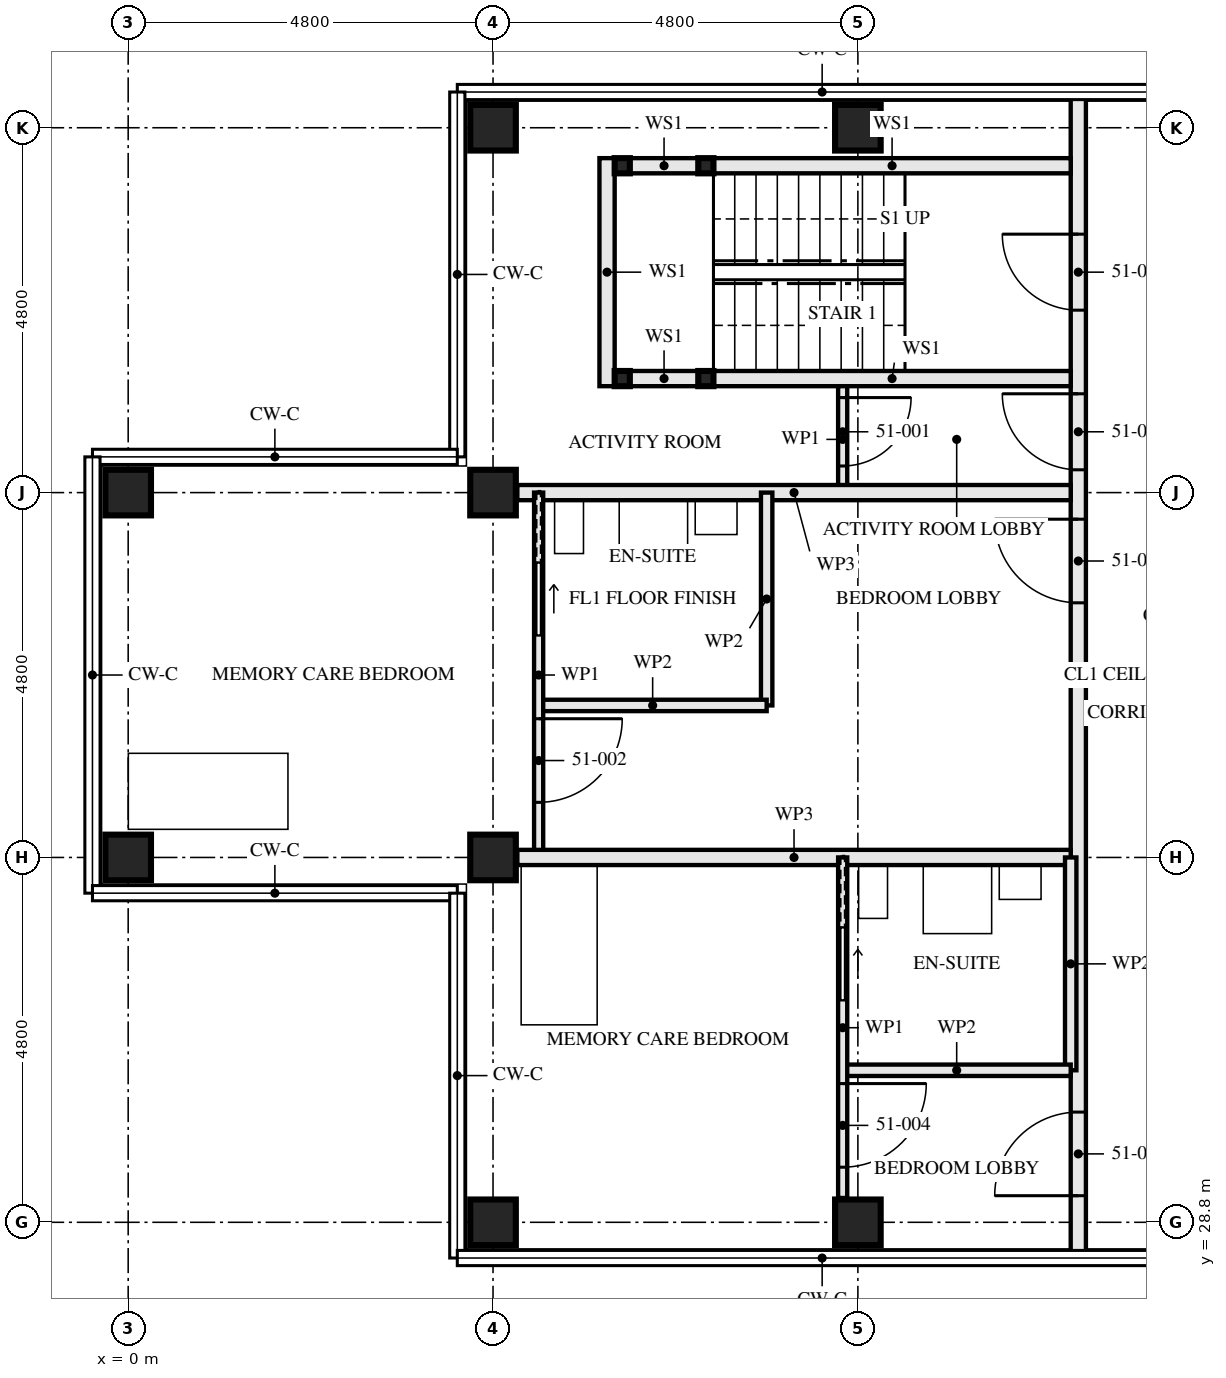
"""IFC4 building model, lengths in metres.
Left out: names, types, materials, properties, quantities, classifications, styles, units other than length and angle.
Written with IfcOpenShell. Run it as: python <this file> out.ifc"""

import sys

from ifc_helpers import new_model, si_unit, direction, frame, frame_2d, origin, origin_2d, place, context, subcontext, project, spatial, rectangle, hollow_rectangle, extrude, element, fill, save


model = new_model("IFC4")
c1 = context("Model", 3, precision=1e-05, world=origin(), true_north=direction((0.0, 1.0)))
c2 = subcontext(c1, "Body", "Model", "MODEL_VIEW")
j1 = project(units=[si_unit("LENGTHUNIT", "METRE"), si_unit("PLANEANGLEUNIT", "RADIAN")], contexts=[c1])
p1 = place(None, origin())
s1 = spatial("IfcSite", under=j1, at=p1, CompositionType="ELEMENT")
p2 = place(p1, origin())
s2 = spatial("IfcBuilding", under=s1, at=p2, CompositionType="ELEMENT")
p3 = place(p2, frame((0.0, 0.0, 186.5)))
s3 = spatial("IfcBuildingStorey", under=s2, at=p3, CompositionType="ELEMENT", Elevation=186.5)
for number, where, z_axis, x_axis in (
    (1, (0.0, 33.6, 0.0), (0.0, 0.0, 1.0), (0.0, 1.0, 0.0)),
    (2, (0.0, 38.4, 0.0), (0.0, 0.0, 1.0), (0.0, 1.0, 0.0)),
    (3, (4.8, 28.8, 0.0), (0.0, 0.0, 1.0), (0.0, 1.0, 0.0)),
    (4, (4.8, 33.6, 0.0), (0.0, 0.0, 1.0), (0.0, 1.0, 0.0)),
    (5, (4.8, 38.4, 0.0), (0.0, 0.0, 1.0), (0.0, 1.0, 0.0)),
    (6, (4.8, 43.2, 0.0), (0.0, 0.0, 1.0), (0.0, 1.0, 0.0)),
    (7, (9.6, 28.8, 0.0), (0.0, 0.0, 1.0), (0.0, 1.0, 0.0)),
    (8, (9.6, 43.2, 0.0), (0.0, 0.0, 1.0), (0.0, 1.0, 0.0)),
):
    element("IfcColumn", number, at=place(p3, frame(where, z_axis=z_axis, x_axis=x_axis)), inside=s3, PredefinedType="COLUMN", context=c2, shape_type="SweptSolid", body=[
        extrude(hollow_rectangle(XDim=0.6, YDim=0.6, WallThickness=0.08, at=origin_2d()), origin(), (0.0, 0.0, 1.0), 3.5),
    ])
for number, where, z_axis, x_axis in (
    (9, (6.5, 42.7, 0.0), (0.0, 0.0, 1.0), (1.0, 0.0, 0.0)),
    (10, (6.5, 39.9, 0.0), (0.0, 0.0, 1.0), (1.0, 0.0, 0.0)),
    (11, (7.6, 42.7, 0.0), (0.0, 0.0, 1.0), (1.0, 0.0, 0.0)),
    (12, (7.6, 39.9, 0.0), (0.0, 0.0, 1.0), (1.0, 0.0, 0.0)),
):
    element("IfcColumn", number, at=place(p3, frame(where, z_axis=z_axis, x_axis=x_axis)), inside=s3, PredefinedType="COLUMN", context=c2, shape_type="SweptSolid", body=[
        extrude(hollow_rectangle(XDim=0.2, YDim=0.2, WallThickness=0.008, at=origin_2d()), origin(), (0.0, 0.0, 1.0), 3.25),
    ])
p4 = place(p3, frame((6.6, 42.7, 0.0), z_axis=(0.0, 0.0, 1.0), x_axis=(1.0, 0.0, 0.0)))
e13 = element("IfcWall", 13, at=p4, inside=s3, PredefinedType="SOLIDWALL", context=c2, shape_type="SweptSolid", body=[
    extrude(rectangle(XDim=0.9, YDim=0.2, at=frame_2d((0.45, 0.0))), origin(), (0.0, 0.0, 1.0), 2.94),
])
p5 = place(p3, frame((7.7, 42.7, 0.0), z_axis=(0.0, 0.0, 1.0), x_axis=(1.0, 0.0, 0.0)))
e14 = element("IfcWall", 14, at=p5, inside=s3, PredefinedType="SOLIDWALL", context=c2, shape_type="SweptSolid", body=[
    extrude(rectangle(XDim=4.7, YDim=0.2, at=frame_2d((2.35, 0.0))), origin(), (0.0, 0.0, 1.0), 2.94),
])
p6 = place(p3, frame((6.6, 39.9, 0.0), z_axis=(0.0, 0.0, 1.0), x_axis=(1.0, 0.0, 0.0)))
e15 = element("IfcWall", 15, at=p6, inside=s3, PredefinedType="SOLIDWALL", context=c2, shape_type="SweptSolid", body=[
    extrude(rectangle(XDim=0.9, YDim=0.2, at=frame_2d((0.45, 0.0))), origin(), (0.0, 0.0, 1.0), 2.94),
])
p7 = place(p3, frame((7.7, 39.9, 0.0), z_axis=(0.0, 0.0, 1.0), x_axis=(1.0, 0.0, 0.0)))
e16 = element("IfcWall", 16, at=p7, inside=s3, PredefinedType="SOLIDWALL", context=c2, shape_type="SweptSolid", body=[
    extrude(rectangle(XDim=4.7, YDim=0.2, at=frame_2d((2.35, 0.0))), origin(), (0.0, 0.0, 1.0), 2.94),
])
p8 = place(p3, frame((6.3, 42.8, 0.0), z_axis=(0.0, 0.0, 1.0), x_axis=(0.0, -1.0, 0.0)))
e17 = element("IfcWall", 17, at=p8, inside=s3, PredefinedType="SOLIDWALL", context=c2, shape_type="SweptSolid", body=[
    extrude(rectangle(XDim=3.0, YDim=0.2, at=frame_2d((1.5, 0.0))), origin(), (0.0, 0.0, 1.0), 3.25),
])
p9 = place(p3, frame((9.4, 39.8, 0.0), z_axis=(0.0, 0.0, 1.0), x_axis=(0.0, -1.0, 0.0)))
e18 = element("IfcWall", 18, at=p9, inside=s3, PredefinedType="PARTITIONING", context=c2, shape_type="SweptSolid", body=[
    extrude(rectangle(XDim=1.4, YDim=0.12, at=frame_2d((0.7, 0.0))), origin(), (0.0, 0.0, 1.0), 3.25),
])
p10 = place(p9, frame((0.15, 0.0, 0.0)))
e19 = element("IfcOpeningElement", 19, at=p10, cuts=e18, PredefinedType="OPENING", context=c2, shape_type="SweptSolid", body=[
    extrude(rectangle(XDim=0.9, YDim=2.1, at=frame_2d((0.45, 1.05))), frame((0.0, 0.071, 0.0), z_axis=(0.0, -1.0, 0.0), x_axis=(1.0, 0.0, 0.0)), (0.0, 0.0, 1.0), 0.141),
])
p11 = place(p3, frame((5.12, 38.4, 0.0), z_axis=(0.0, 0.0, 1.0), x_axis=(1.0, 0.0, 0.0)))
e20 = element("IfcWall", 20, at=p11, inside=s3, PredefinedType="PARTITIONING", context=c2, shape_type="SweptSolid", body=[
    extrude(rectangle(XDim=7.28, YDim=0.2, at=frame_2d((3.64, 0.0))), origin(), (0.0, 0.0, 1.0), 2.24),
])
p12 = place(p3, frame((5.4, 35.6, 0.0), z_axis=(0.0, 0.0, 1.0), x_axis=(1.0, 0.0, 0.0)))
e21 = element("IfcWall", 21, at=p12, inside=s3, PredefinedType="PARTITIONING", context=c2, shape_type="SweptSolid", body=[
    extrude(rectangle(XDim=3.0, YDim=0.15, at=frame_2d((1.5, 0.0))), origin(), (0.0, 0.0, 1.0), 3.25),
])
p13 = place(p3, frame((8.4, 38.4, 0.0), z_axis=(0.0, 0.0, 1.0), x_axis=(0.0, -1.0, 0.0)))
e22 = element("IfcWall", 22, at=p13, inside=s3, PredefinedType="PARTITIONING", context=c2, shape_type="SweptSolid", body=[
    extrude(rectangle(XDim=2.8, YDim=0.15, at=frame_2d((1.4, 0.0))), origin(), (0.0, 0.0, 1.0), 3.25),
])
p14 = place(p3, frame((5.4, 38.4, 0.0), z_axis=(0.0, 0.0, 1.0), x_axis=(0.0, -1.0, 0.0)))
e23 = element("IfcWall", 23, at=p14, inside=s3, PredefinedType="PARTITIONING", context=c2, shape_type="SweptSolid", body=[
    extrude(rectangle(XDim=4.8, YDim=0.12, at=frame_2d((2.4, 0.0))), origin(), (0.0, 0.0, 1.0), 3.25),
])
p15 = place(p14, frame((2.975, 0.0, 0.0)))
e24 = element("IfcOpeningElement", 24, at=p15, cuts=e23, PredefinedType="OPENING", context=c2, shape_type="SweptSolid", body=[
    extrude(rectangle(XDim=1.1, YDim=2.1, at=frame_2d((0.55, 1.05))), frame((0.0, 0.071, 0.0), z_axis=(0.0, -1.0, 0.0), x_axis=(1.0, 0.0, 0.0)), (0.0, 0.0, 1.0), 0.141),
])
p16 = place(p14, frame((0.925, 0.0, 0.0)))
e25 = element("IfcOpeningElement", 25, at=p16, cuts=e23, PredefinedType="OPENING", context=c2, shape_type="SweptSolid", body=[
    extrude(rectangle(XDim=0.95, YDim=2.1, at=frame_2d((0.475, 1.05))), frame((0.0, 0.071, 0.0), z_axis=(0.0, -1.0, 0.0), x_axis=(1.0, 0.0, 0.0)), (0.0, 0.0, 1.0), 0.141),
])
p17 = place(p3, frame((5.12, 33.6, 0.0), z_axis=(0.0, 0.0, 1.0), x_axis=(1.0, 0.0, 0.0)))
e26 = element("IfcWall", 26, at=p17, inside=s3, PredefinedType="PARTITIONING", context=c2, shape_type="SweptSolid", body=[
    extrude(rectangle(XDim=7.28, YDim=0.2, at=frame_2d((3.64, 0.0))), origin(), (0.0, 0.0, 1.0), 2.24),
])
p18 = place(p3, frame((9.4, 30.8, 0.0), z_axis=(0.0, 0.0, 1.0), x_axis=(1.0, 0.0, 0.0)))
e27 = element("IfcWall", 27, at=p18, inside=s3, PredefinedType="PARTITIONING", context=c2, shape_type="SweptSolid", body=[
    extrude(rectangle(XDim=3.0, YDim=0.15, at=frame_2d((1.5, 0.0))), origin(), (0.0, 0.0, 1.0), 3.25),
])
p19 = place(p3, frame((12.4, 33.6, 0.0), z_axis=(0.0, 0.0, 1.0), x_axis=(0.0, -1.0, 0.0)))
e28 = element("IfcWall", 28, at=p19, inside=s3, PredefinedType="PARTITIONING", context=c2, shape_type="SweptSolid", body=[
    extrude(rectangle(XDim=2.8, YDim=0.15, at=frame_2d((1.4, 0.0))), origin(), (0.0, 0.0, 1.0), 3.25),
])
p20 = place(p3, frame((9.4, 33.6, 0.0), z_axis=(0.0, 0.0, 1.0), x_axis=(0.0, -1.0, 0.0)))
e29 = element("IfcWall", 29, at=p20, inside=s3, PredefinedType="PARTITIONING", context=c2, shape_type="SweptSolid", body=[
    extrude(rectangle(XDim=4.48, YDim=0.12, at=frame_2d((2.24, 0.0))), origin(), (0.0, 0.0, 1.0), 3.25),
])
p21 = place(p20, frame((2.975, 0.0, 0.0)))
e30 = element("IfcOpeningElement", 30, at=p21, cuts=e29, PredefinedType="OPENING", context=c2, shape_type="SweptSolid", body=[
    extrude(rectangle(XDim=1.1, YDim=2.1, at=frame_2d((0.55, 1.05))), frame((0.0, 0.071, 0.0), z_axis=(0.0, -1.0, 0.0), x_axis=(1.0, 0.0, 0.0)), (0.0, 0.0, 1.0), 0.141),
])
p22 = place(p20, frame((0.925, 0.0, 0.0)))
e31 = element("IfcOpeningElement", 31, at=p22, cuts=e29, PredefinedType="OPENING", context=c2, shape_type="SweptSolid", body=[
    extrude(rectangle(XDim=0.95, YDim=2.1, at=frame_2d((0.475, 1.05))), frame((0.0, 0.071, 0.0), z_axis=(0.0, -1.0, 0.0), x_axis=(1.0, 0.0, 0.0)), (0.0, 0.0, 1.0), 0.141),
])
p23 = place(p3, frame((12.5, 43.65, 0.0), z_axis=(0.0, 0.0, 1.0), x_axis=(0.0, -1.0, 0.0)))
e32 = element("IfcWall", 32, at=p23, inside=s3, PredefinedType="PARTITIONING", context=c2, shape_type="SweptSolid", body=[
    extrude(rectangle(XDim=15.3, YDim=0.2, at=frame_2d((7.65, 0.0))), origin(), (0.0, 0.0, 1.0), 2.04),
])
p24 = place(p23, frame((1.85, 0.0, 0.0)))
e33 = element("IfcOpeningElement", 33, at=p24, cuts=e32, PredefinedType="OPENING", context=c2, shape_type="SweptSolid", body=[
    extrude(rectangle(XDim=1.0, YDim=2.0, at=frame_2d((0.5, 1.0))), frame((0.0, 0.111, 0.0), z_axis=(0.0, -1.0, 0.0), x_axis=(1.0, 0.0, 0.0)), (0.0, 0.0, 1.0), 0.221),
])
p25 = place(p23, frame((3.95, 0.0, 0.0)))
e34 = element("IfcOpeningElement", 34, at=p25, cuts=e32, PredefinedType="OPENING", context=c2, shape_type="SweptSolid", body=[
    extrude(rectangle(XDim=1.0, YDim=2.0, at=frame_2d((0.5, 1.0))), frame((0.0, 0.111, 0.0), z_axis=(0.0, -1.0, 0.0), x_axis=(1.0, 0.0, 0.0)), (0.0, 0.0, 1.0), 0.221),
])
p26 = place(p23, frame((5.6, 0.0, 0.0)))
e35 = element("IfcOpeningElement", 35, at=p26, cuts=e32, PredefinedType="OPENING", context=c2, shape_type="SweptSolid", body=[
    extrude(rectangle(XDim=1.1, YDim=2.0, at=frame_2d((0.55, 1.0))), frame((0.0, 0.111, 0.0), z_axis=(0.0, -1.0, 0.0), x_axis=(1.0, 0.0, 0.0)), (0.0, 0.0, 1.0), 0.221),
])
p27 = place(p23, frame((13.4, 0.0, 0.0)))
e36 = element("IfcOpeningElement", 36, at=p27, cuts=e32, PredefinedType="OPENING", context=c2, shape_type="SweptSolid", body=[
    extrude(rectangle(XDim=1.1, YDim=2.0, at=frame_2d((0.55, 1.0))), frame((0.0, 0.111, 0.0), z_axis=(0.0, -1.0, 0.0), x_axis=(1.0, 0.0, 0.0)), (0.0, 0.0, 1.0), 0.221),
])
p28 = place(p10, origin())
e37 = element("IfcDoor", 37, at=p28, inside=s3, OperationType="SINGLE_SWING_RIGHT", PredefinedType="DOOR", context=c2, shape_type="SweptSolid", body=[
    extrude(rectangle(XDim=0.9, YDim=2.1, at=frame_2d((0.45, 1.05))), frame((0.0, 0.022, 0.0), z_axis=(0.0, -1.0, 0.0), x_axis=(1.0, 0.0, 0.0)), (0.0, 0.0, 1.0), 0.044),
])
fill(e19, e37)
p29 = place(p15, origin())
e38 = element("IfcDoor", 38, at=p29, inside=s3, OperationType="SINGLE_SWING_RIGHT", PredefinedType="DOOR", context=c2, shape_type="SweptSolid", body=[
    extrude(rectangle(XDim=1.1, YDim=2.1, at=frame_2d((0.55, 1.05))), frame((0.0, 0.022, 0.0), z_axis=(0.0, -1.0, 0.0), x_axis=(1.0, 0.0, 0.0)), (0.0, 0.0, 1.0), 0.044),
])
fill(e24, e38)
p30 = place(p16, origin())
e39 = element("IfcDoor", 39, at=p30, inside=s3, OperationType="SLIDING_TO_RIGHT", PredefinedType="DOOR", context=c2, shape_type="SweptSolid", body=[
    extrude(rectangle(XDim=0.95, YDim=2.1, at=frame_2d((0.475, 1.05))), frame((0.0, 0.022, 0.0), z_axis=(0.0, -1.0, 0.0), x_axis=(1.0, 0.0, 0.0)), (0.0, 0.0, 1.0), 0.044),
])
fill(e25, e39)
p31 = place(p21, origin())
e40 = element("IfcDoor", 40, at=p31, inside=s3, OperationType="SINGLE_SWING_RIGHT", PredefinedType="DOOR", context=c2, shape_type="SweptSolid", body=[
    extrude(rectangle(XDim=1.1, YDim=2.1, at=frame_2d((0.55, 1.05))), frame((0.0, 0.022, 0.0), z_axis=(0.0, -1.0, 0.0), x_axis=(1.0, 0.0, 0.0)), (0.0, 0.0, 1.0), 0.044),
])
fill(e30, e40)
p32 = place(p22, origin())
e41 = element("IfcDoor", 41, at=p32, inside=s3, OperationType="SLIDING_TO_RIGHT", PredefinedType="DOOR", context=c2, shape_type="SweptSolid", body=[
    extrude(rectangle(XDim=0.95, YDim=2.1, at=frame_2d((0.475, 1.05))), frame((0.0, 0.022, 0.0), z_axis=(0.0, -1.0, 0.0), x_axis=(1.0, 0.0, 0.0)), (0.0, 0.0, 1.0), 0.044),
])
fill(e31, e41)
p33 = place(p24, frame((1.0, 0.0, 0.0), z_axis=(0.0, 0.0, 1.0), x_axis=(-1.0, 0.0, 0.0)))
e42 = element("IfcDoor", 42, at=p33, inside=s3, OperationType="SINGLE_SWING_LEFT", PredefinedType="DOOR", context=c2, shape_type="SweptSolid", body=[
    extrude(rectangle(XDim=1.0, YDim=2.0, at=frame_2d((0.5, 1.0))), frame((0.0, 0.032, 0.0), z_axis=(0.0, -1.0, 0.0), x_axis=(1.0, 0.0, 0.0)), (0.0, 0.0, 1.0), 0.064),
])
fill(e33, e42)
p34 = place(p25, frame((1.0, 0.0, 0.0), z_axis=(0.0, 0.0, 1.0), x_axis=(-1.0, 0.0, 0.0)))
e43 = element("IfcDoor", 43, at=p34, inside=s3, OperationType="SINGLE_SWING_LEFT", PredefinedType="DOOR", context=c2, shape_type="SweptSolid", body=[
    extrude(rectangle(XDim=1.0, YDim=2.0, at=frame_2d((0.5, 1.0))), frame((0.0, 0.027, 0.0), z_axis=(0.0, -1.0, 0.0), x_axis=(1.0, 0.0, 0.0)), (0.0, 0.0, 1.0), 0.054),
])
fill(e34, e43)
p35 = place(p26, frame((1.1, 0.0, 0.0), z_axis=(0.0, 0.0, 1.0), x_axis=(-1.0, 0.0, 0.0)))
e44 = element("IfcDoor", 44, at=p35, inside=s3, OperationType="SINGLE_SWING_LEFT", PredefinedType="DOOR", context=c2, shape_type="SweptSolid", body=[
    extrude(rectangle(XDim=1.1, YDim=2.0, at=frame_2d((0.55, 1.0))), frame((0.0, 0.027, 0.0), z_axis=(0.0, -1.0, 0.0), x_axis=(1.0, 0.0, 0.0)), (0.0, 0.0, 1.0), 0.054),
])
fill(e35, e44)
p36 = place(p27, frame((1.1, 0.0, 0.0), z_axis=(0.0, 0.0, 1.0), x_axis=(-1.0, 0.0, 0.0)))
e45 = element("IfcDoor", 45, at=p36, inside=s3, OperationType="SINGLE_SWING_RIGHT", PredefinedType="DOOR", context=c2, shape_type="SweptSolid", body=[
    extrude(rectangle(XDim=1.1, YDim=2.0, at=frame_2d((0.55, 1.0))), frame((0.0, 0.027, 0.0), z_axis=(0.0, -1.0, 0.0), x_axis=(1.0, 0.0, 0.0)), (0.0, 0.0, 1.0), 0.054),
])
fill(e36, e45)
save(model, sys.argv[1])
